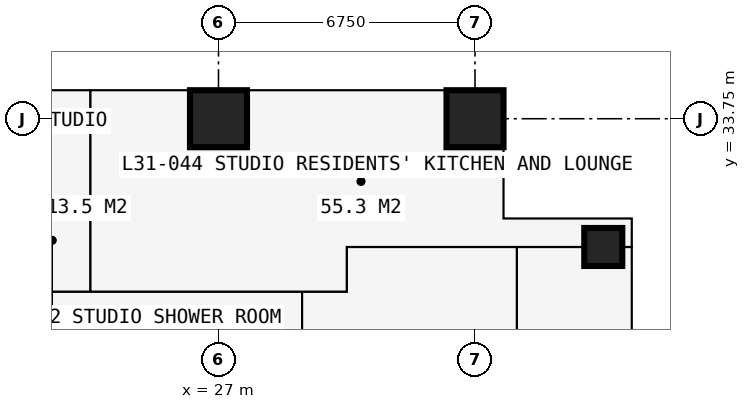
"""IFC4 building model, lengths in metres.
Left out: names, types, materials, properties, quantities, classifications, styles, units other than length and angle.
Written with IfcOpenShell. Run it as: python <this file> out.ifc"""

import sys

from ifc_helpers import new_model, si_unit, direction, frame, frame_2d, origin, origin_2d, place, context, subcontext, project, spatial, rectangle, extrude, element, fill, save


model = new_model("IFC4")
c1 = context("Model", 3, precision=1e-05, world=origin(), true_north=direction((0.0, 1.0)))
c2 = subcontext(c1, "Body", "Model", "MODEL_VIEW")
j1 = project(units=[si_unit("LENGTHUNIT", "METRE"), si_unit("PLANEANGLEUNIT", "RADIAN")], contexts=[c1])
p1 = place(None, origin())
s1 = spatial("IfcSite", under=j1, at=p1, CompositionType="ELEMENT")
p2 = place(p1, origin())
s2 = spatial("IfcBuilding", under=s1, at=p2, CompositionType="ELEMENT")
p3 = place(p2, frame((0.0, 0.0, 116.1)))
s3 = spatial("IfcBuildingStorey", under=s2, at=p3, CompositionType="ELEMENT", Elevation=116.1)
for number, where, z_axis, x_axis in (
    (1, (27.0, 33.75, 0.0), (0.0, 0.0, 1.0), (1.0, 0.0, 0.0)),
    (2, (33.75, 33.75, 0.0), (0.0, 0.0, 1.0), (1.0, 0.0, 0.0)),
):
    element("IfcColumn", number, at=place(p3, frame(where, z_axis=z_axis, x_axis=x_axis)), inside=s3, PredefinedType="COLUMN", context=c2, shape_type="SweptSolid", body=[
        extrude(rectangle(XDim=1.5, YDim=1.5, at=origin_2d()), origin(), (0.0, 0.0, 1.0), 3.6),
    ])
p4 = place(p3, frame((37.125, 30.375, 0.0), z_axis=(0.0, 0.0, 1.0), x_axis=(1.0, 0.0, 0.0)))
e3 = element("IfcColumn", 3, at=p4, inside=s3, PredefinedType="COLUMN", context=c2, shape_type="SweptSolid", body=[
    extrude(rectangle(XDim=1.0, YDim=1.0, at=origin_2d()), origin(), (0.0, 0.0, 1.0), 3.6),
])
p5 = place(p3, frame((37.875, 27.75, 0.0), z_axis=(0.0, 0.0, 1.0), x_axis=(0.0, 1.0, 0.0)))
e4 = element("IfcWall", 4, at=p5, inside=s3, PredefinedType="SOLIDWALL", context=c2, shape_type="SweptSolid", body=[
    extrude(rectangle(XDim=3.375, YDim=0.3, at=frame_2d((1.688, 0.0))), origin(), (0.0, 0.0, 1.0), 3.375),
])
p6 = place(p5, frame((0.788, 0.0, 0.6)))
e5 = element("IfcOpeningElement", 5, at=p6, cuts=e4, PredefinedType="OPENING", context=c2, shape_type="SweptSolid", body=[
    extrude(rectangle(XDim=1.8, YDim=2.1, at=frame_2d((0.9, 1.05))), frame((0.0, 0.16, 0.0), z_axis=(0.0, -1.0, 0.0), x_axis=(1.0, 0.0, 0.0)), (0.0, 0.0, 1.0), 0.32),
])
p7 = place(p3, frame((37.875, 31.125, 0.0), z_axis=(0.0, 0.0, 1.0), x_axis=(-1.0, 0.0, 0.0)))
e6 = element("IfcWall", 6, at=p7, inside=s3, PredefinedType="SOLIDWALL", context=c2, shape_type="SweptSolid", body=[
    extrude(rectangle(XDim=3.375, YDim=0.3, at=frame_2d((1.688, 0.0))), origin(), (0.0, 0.0, 1.0), 3.375),
])
p8 = place(p7, frame((0.788, 0.0, 0.6)))
e7 = element("IfcOpeningElement", 7, at=p8, cuts=e6, PredefinedType="OPENING", context=c2, shape_type="SweptSolid", body=[
    extrude(rectangle(XDim=1.8, YDim=2.1, at=frame_2d((0.9, 1.05))), frame((0.0, 0.16, 0.0), z_axis=(0.0, -1.0, 0.0), x_axis=(1.0, 0.0, 0.0)), (0.0, 0.0, 1.0), 0.32),
])
p9 = place(p3, frame((34.5, 31.125, 0.0), z_axis=(0.0, 0.0, 1.0), x_axis=(0.0, 1.0, 0.0)))
e8 = element("IfcWall", 8, at=p9, inside=s3, PredefinedType="SOLIDWALL", context=c2, shape_type="SweptSolid", body=[
    extrude(rectangle(XDim=3.375, YDim=0.3, at=frame_2d((1.688, 0.0))), origin(), (0.0, 0.0, 1.0), 3.375),
])
p10 = place(p9, frame((0.268, 0.0, 0.9)))
e9 = element("IfcOpeningElement", 9, at=p10, cuts=e8, PredefinedType="OPENING", context=c2, shape_type="SweptSolid", body=[
    extrude(rectangle(XDim=1.5, YDim=1.8, at=frame_2d((0.75, 0.9))), frame((0.0, 0.16, 0.0), z_axis=(0.0, -1.0, 0.0), x_axis=(1.0, 0.0, 0.0)), (0.0, 0.0, 1.0), 0.32),
])
p11 = place(p3, frame((11.3, 29.2, 0.0), z_axis=(0.0, 0.0, 1.0), x_axis=(1.0, 0.0, 0.0)))
e10 = element("IfcWall", 10, at=p11, inside=s3, PredefinedType="PARTITIONING", context=c2, shape_type="SweptSolid", body=[
    extrude(rectangle(XDim=19.075, YDim=0.15, at=frame_2d((9.538, 0.0))), origin(), (0.0, 0.0, 1.0), 3.375),
])
p12 = place(p11, frame((5.825, 0.0, 0.0)))
e11 = element("IfcOpeningElement", 11, at=p12, cuts=e10, PredefinedType="OPENING", context=c2, shape_type="SweptSolid", body=[
    extrude(rectangle(XDim=0.95, YDim=2.2, at=frame_2d((0.475, 1.1))), frame((0.0, 0.085, 0.0), z_axis=(0.0, -1.0, 0.0), x_axis=(1.0, 0.0, 0.0)), (0.0, 0.0, 1.0), 0.17),
])
p13 = place(p11, frame((9.2, 0.0, 0.0)))
e12 = element("IfcOpeningElement", 12, at=p13, cuts=e10, PredefinedType="OPENING", context=c2, shape_type="SweptSolid", body=[
    extrude(rectangle(XDim=0.95, YDim=2.2, at=frame_2d((0.475, 1.1))), frame((0.0, 0.085, 0.0), z_axis=(0.0, -1.0, 0.0), x_axis=(1.0, 0.0, 0.0)), (0.0, 0.0, 1.0), 0.17),
])
p14 = place(p11, frame((0.6, 0.0, 0.0)))
e13 = element("IfcOpeningElement", 13, at=p14, cuts=e10, PredefinedType="OPENING", context=c2, shape_type="SweptSolid", body=[
    extrude(rectangle(XDim=1.0, YDim=2.2, at=frame_2d((0.5, 1.1))), frame((0.0, 0.085, 0.0), z_axis=(0.0, -1.0, 0.0), x_axis=(1.0, 0.0, 0.0)), (0.0, 0.0, 1.0), 0.17),
])
p15 = place(p3, frame((21.625, 31.4, 0.0), z_axis=(0.0, 0.0, 1.0), x_axis=(1.0, 0.0, 0.0)))
e14 = element("IfcWall", 14, at=p15, inside=s3, PredefinedType="PARTITIONING", context=c2, shape_type="SweptSolid", body=[
    extrude(rectangle(XDim=2.0, YDim=0.1, at=frame_2d((1.0, 0.0))), origin(), (0.0, 0.0, 1.0), 3.375),
])
p16 = place(p3, frame((23.625, 29.2, 0.0), z_axis=(0.0, 0.0, 1.0), x_axis=(0.0, 1.0, 0.0)))
e15 = element("IfcWall", 15, at=p16, inside=s3, PredefinedType="PARTITIONING", context=c2, shape_type="SweptSolid", body=[
    extrude(rectangle(XDim=5.284, YDim=0.15, at=frame_2d((2.642, 0.0))), origin(), (0.0, 0.0, 1.0), 3.375),
])
p17 = place(p3, frame((29.2, 11.3, 0.0), z_axis=(0.0, 0.0, 1.0), x_axis=(0.0, 1.0, 0.0)))
e16 = element("IfcWall", 16, at=p17, inside=s3, PredefinedType="PARTITIONING", context=c2, shape_type="SweptSolid", body=[
    extrude(rectangle(XDim=17.9, YDim=0.2, at=frame_2d((8.95, 0.0))), origin(), (0.0, 0.0, 1.0), 3.375),
])
p18 = place(p17, frame((8.35, 0.0, 0.0)))
e17 = element("IfcOpeningElement", 17, at=p18, cuts=e16, PredefinedType="OPENING", context=c2, shape_type="SweptSolid", body=[
    extrude(rectangle(XDim=1.2, YDim=2.2, at=frame_2d((0.6, 1.1))), frame((0.0, 0.11, 0.0), z_axis=(0.0, -1.0, 0.0), x_axis=(1.0, 0.0, 0.0)), (0.0, 0.0, 1.0), 0.22),
])
p19 = place(p3, frame((30.375, 29.2, 0.0), z_axis=(0.0, 0.0, 1.0), x_axis=(0.0, 1.0, 0.0)))
e18 = element("IfcWall", 18, at=p19, inside=s3, PredefinedType="PARTITIONING", context=c2, shape_type="SweptSolid", body=[
    extrude(rectangle(XDim=1.175, YDim=0.15, at=frame_2d((0.587, 0.0))), origin(), (0.0, 0.0, 1.0), 3.375),
])
p20 = place(p3, frame((30.375, 30.375, 0.0), z_axis=(0.0, 0.0, 1.0), x_axis=(1.0, 0.0, 0.0)))
e19 = element("IfcWall", 19, at=p20, inside=s3, PredefinedType="PARTITIONING", context=c2, shape_type="SweptSolid", body=[
    extrude(rectangle(XDim=7.35, YDim=0.15, at=frame_2d((3.675, 0.0))), origin(), (0.0, 0.0, 1.0), 2.877),
])
p21 = place(p20, frame((5.225, 0.0, 0.0)))
e20 = element("IfcOpeningElement", 20, at=p21, cuts=e19, PredefinedType="OPENING", context=c2, shape_type="SweptSolid", body=[
    extrude(rectangle(XDim=1.0, YDim=2.2, at=frame_2d((0.5, 1.1))), frame((0.0, 0.085, 0.0), z_axis=(0.0, -1.0, 0.0), x_axis=(1.0, 0.0, 0.0)), (0.0, 0.0, 1.0), 0.17),
])
p22 = place(p3, frame((34.85, 12.55, 0.0), z_axis=(0.0, 0.0, 1.0), x_axis=(0.0, 1.0, 0.0)))
e21 = element("IfcWall", 21, at=p22, inside=s3, PredefinedType="PARTITIONING", context=c2, shape_type="SweptSolid", body=[
    extrude(rectangle(XDim=17.825, YDim=0.15, at=frame_2d((8.913, 0.0))), origin(), (0.0, 0.0, 1.0), 3.375),
])
p23 = place(p22, frame((8.5, 0.0, 0.0)))
e22 = element("IfcOpeningElement", 22, at=p23, cuts=e21, PredefinedType="OPENING", context=c2, shape_type="SweptSolid", body=[
    extrude(rectangle(XDim=0.95, YDim=2.2, at=frame_2d((0.475, 1.1))), frame((0.0, 0.085, 0.0), z_axis=(0.0, -1.0, 0.0), x_axis=(1.0, 0.0, 0.0)), (0.0, 0.0, 1.0), 0.17),
])
p24 = place(p6, origin())
e23 = element("IfcWindow", 23, at=p24, inside=s3, PartitioningType="SINGLE_PANEL", PredefinedType="WINDOW", context=c2, shape_type="SweptSolid", body=[
    extrude(rectangle(XDim=1.8, YDim=2.1, at=frame_2d((0.9, 1.05))), frame((0.0, 0.03, 0.0), z_axis=(0.0, -1.0, 0.0), x_axis=(1.0, 0.0, 0.0)), (0.0, 0.0, 1.0), 0.06),
])
fill(e5, e23)
p25 = place(p8, origin())
e24 = element("IfcWindow", 24, at=p25, inside=s3, PartitioningType="SINGLE_PANEL", PredefinedType="WINDOW", context=c2, shape_type="SweptSolid", body=[
    extrude(rectangle(XDim=1.8, YDim=2.1, at=frame_2d((0.9, 1.05))), frame((0.0, 0.03, 0.0), z_axis=(0.0, -1.0, 0.0), x_axis=(1.0, 0.0, 0.0)), (0.0, 0.0, 1.0), 0.06),
])
fill(e7, e24)
p26 = place(p10, origin())
e25 = element("IfcWindow", 25, at=p26, inside=s3, PartitioningType="SINGLE_PANEL", PredefinedType="WINDOW", context=c2, shape_type="SweptSolid", body=[
    extrude(rectangle(XDim=1.5, YDim=1.8, at=frame_2d((0.75, 0.9))), frame((0.0, 0.03, 0.0), z_axis=(0.0, -1.0, 0.0), x_axis=(1.0, 0.0, 0.0)), (0.0, 0.0, 1.0), 0.06),
])
fill(e9, e25)
p27 = place(p21, origin())
e26 = element("IfcDoor", 26, at=p27, inside=s3, OperationType="SINGLE_SWING_LEFT", PredefinedType="DOOR", context=c2, shape_type="SweptSolid", body=[
    extrude(rectangle(XDim=1.0, YDim=2.2, at=frame_2d((0.5, 1.1))), frame((0.0, 0.025, 0.0), z_axis=(0.0, -1.0, 0.0), x_axis=(1.0, 0.0, 0.0)), (0.0, 0.0, 1.0), 0.05),
])
fill(e20, e26)
save(model, sys.argv[1])
